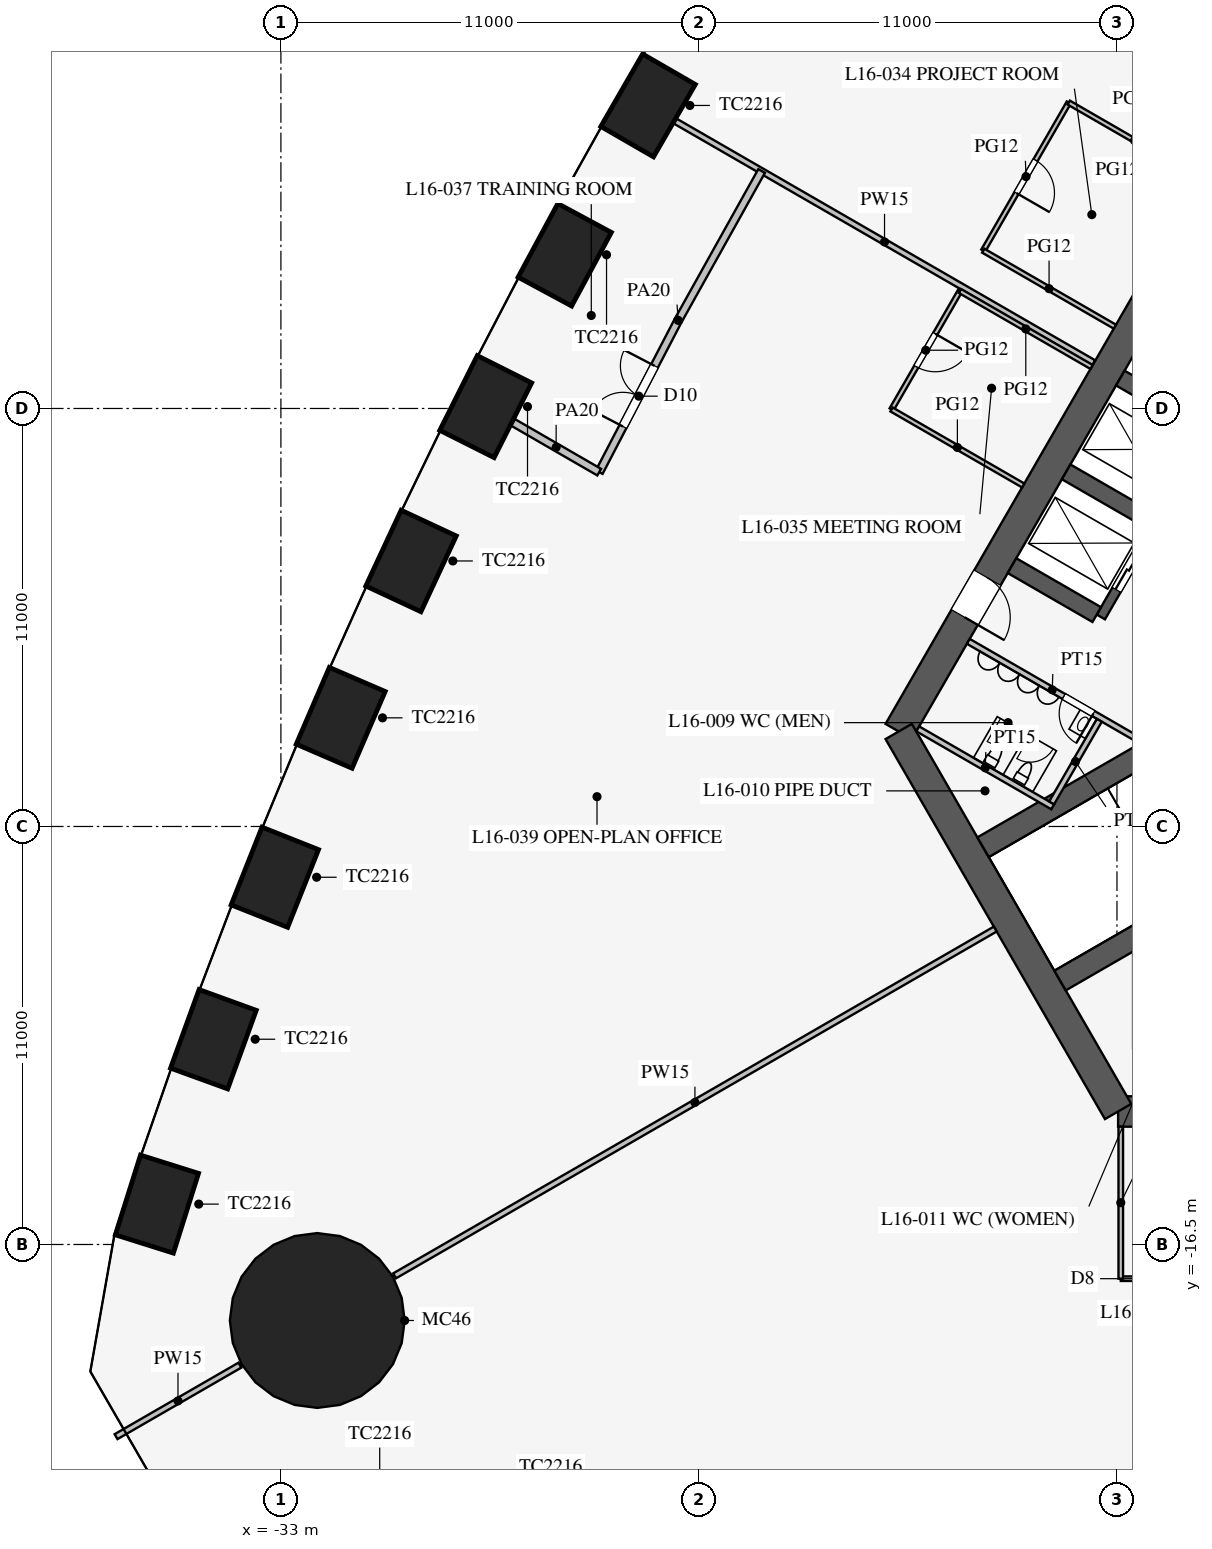
"""IFC4 building model, lengths in metres.
Left out: names, types, materials, properties, quantities, classifications, styles, units other than length and angle.
Written with IfcOpenShell. Run it as: python <this file> out.ifc"""

import sys

from ifc_helpers import new_model, si_unit, direction, frame, frame_2d, origin, origin_2d, place, context, subcontext, project, spatial, rectangle, circle, extrude, element, fill, save


model = new_model("IFC4")
c1 = context("Model", 3, precision=1e-05, world=origin(), true_north=direction((0.0, 1.0)))
c2 = subcontext(c1, "Body", "Model", "MODEL_VIEW")
j1 = project(units=[si_unit("LENGTHUNIT", "METRE"), si_unit("PLANEANGLEUNIT", "RADIAN")], contexts=[c1])
p1 = place(None, origin())
s1 = spatial("IfcSite", under=j1, at=p1, CompositionType="ELEMENT")
p2 = place(p1, origin())
s2 = spatial("IfcBuilding", under=s1, at=p2, CompositionType="ELEMENT")
p3 = place(p2, frame((0.0, 0.0, 71.1)))
s3 = spatial("IfcBuildingStorey", under=s2, at=p3, CompositionType="ELEMENT", Elevation=71.1)
for number, where, z_axis, x_axis in (
    (1, (-23.338, 13.474, 0.0), (0.0, 0.0, 1.0), (-0.5, -0.866, 0.0)),
    (2, (-25.531, 9.544, 0.0), (0.0, 0.0, 1.0), (-0.475, -0.88, 0.0)),
    (3, (-27.611, 5.549, 0.0), (0.0, 0.0, 1.0), (-0.449, -0.894, 0.0)),
    (4, (-29.576, 1.487, 0.0), (0.0, 0.0, 1.0), (-0.423, -0.906, 0.0)),
    (5, (-31.426, -2.641, 0.0), (0.0, 0.0, 1.0), (-0.396, -0.918, 0.0)),
    (6, (-33.16, -6.836, 0.0), (0.0, 0.0, 1.0), (-0.369, -0.929, 0.0)),
    (7, (-34.776, -11.099, 0.0), (0.0, 0.0, 1.0), (-0.342, -0.94, 0.0)),
    (8, (-36.262, -15.438, 0.0), (0.0, 0.0, 1.0), (-0.3, -0.954, 0.0)),
):
    element("IfcColumn", number, at=place(p3, frame(where, z_axis=z_axis, x_axis=x_axis)), inside=s3, PredefinedType="COLUMN", context=c2, shape_type="SweptSolid", body=[
        extrude(rectangle(XDim=2.2, YDim=1.6, at=origin_2d()), origin(), (0.0, 0.0, 1.0), 4.2),
    ])
p4 = place(p3, frame((-32.043, -18.5, 0.0), z_axis=(0.0, 0.0, 1.0), x_axis=(1.0, 0.0, 0.0)))
e9 = element("IfcColumn", 9, at=p4, inside=s3, PredefinedType="COLUMN", context=c2, shape_type="SweptSolid", body=[
    extrude(circle(Radius=2.3, at=origin_2d()), origin(), (0.0, 0.0, 1.0), 4.2),
])
p5 = place(p3, frame((-10.97, -13.0, 0.0), z_axis=(0.0, 0.0, 1.0), x_axis=(1.0, 0.0, 0.0)))
e10 = element("IfcWall", 10, at=p5, inside=s3, PredefinedType="SHEAR", context=c2, shape_type="SweptSolid", body=[
    extrude(rectangle(XDim=21.939, YDim=0.8, at=frame_2d((10.97, 0.0))), origin(), (0.0, 0.0, 1.0), 4.2),
])
p6 = place(p5, frame((17.27, 0.0, 0.0)))
e11 = element("IfcOpeningElement", 11, at=p6, cuts=e10, PredefinedType="OPENING", context=c2, shape_type="SweptSolid", body=[
    extrude(rectangle(XDim=1.2, YDim=2.1, at=frame_2d((0.6, 1.05))), frame((0.0, 0.41, 0.0), z_axis=(0.0, -1.0, 0.0), x_axis=(1.0, 0.0, 0.0)), (0.0, 0.0, 1.0), 0.82),
])
p7 = place(p5, frame((3.47, 0.0, 0.0)))
e12 = element("IfcOpeningElement", 12, at=p7, cuts=e10, PredefinedType="OPENING", context=c2, shape_type="SweptSolid", body=[
    extrude(rectangle(XDim=1.2, YDim=2.1, at=frame_2d((0.6, 1.05))), frame((0.0, 0.41, 0.0), z_axis=(0.0, -1.0, 0.0), x_axis=(1.0, 0.0, 0.0)), (0.0, 0.0, 1.0), 0.82),
])
p8 = place(p3, frame((-5.773, 16.0, 0.0), z_axis=(0.0, 0.0, 1.0), x_axis=(-0.500002442456, -0.866023993627, 0.0)))
e13 = element("IfcWall", 13, at=p8, inside=s3, PredefinedType="SHEAR", context=c2, shape_type="SweptSolid", body=[
    extrude(rectangle(XDim=21.939, YDim=0.8, at=frame_2d((10.97, 0.0))), origin(), (0.0, 0.0, 1.0), 4.2),
])
p9 = place(p8, frame((17.27, 0.0, 0.0)))
e14 = element("IfcOpeningElement", 14, at=p9, cuts=e13, PredefinedType="OPENING", context=c2, shape_type="SweptSolid", body=[
    extrude(rectangle(XDim=1.2, YDim=2.1, at=frame_2d((0.6, 1.05))), frame((0.0, 0.41, 0.0), z_axis=(0.0, -1.0, 0.0), x_axis=(1.0, 0.0, 0.0)), (0.0, 0.0, 1.0), 0.82),
])
p10 = place(p8, frame((3.47, 0.0, 0.0)))
e15 = element("IfcOpeningElement", 15, at=p10, cuts=e13, PredefinedType="OPENING", context=c2, shape_type="SweptSolid", body=[
    extrude(rectangle(XDim=1.2, YDim=2.1, at=frame_2d((0.6, 1.05))), frame((0.0, 0.41, 0.0), z_axis=(0.0, -1.0, 0.0), x_axis=(1.0, 0.0, 0.0)), (0.0, 0.0, 1.0), 0.82),
])
p11 = place(p3, frame((-16.743, -3.0, 0.0), z_axis=(0.0, 0.0, 1.0), x_axis=(0.499995765644, -0.866027848477, 0.0)))
e16 = element("IfcWall", 16, at=p11, inside=s3, PredefinedType="SHEAR", context=c2, shape_type="SweptSolid", body=[
    extrude(rectangle(XDim=11.547, YDim=0.8, at=frame_2d((5.773, 0.0))), origin(), (0.0, 0.0, 1.0), 4.2),
])
p12 = place(p3, frame((-5.724, 9.886, 0.0), z_axis=(0.0, 0.0, 1.0), x_axis=(-0.500001763848, -0.866024385424, 0.0)))
e17 = element("IfcWall", 17, at=p12, inside=s3, PredefinedType="SHEAR", context=c2, shape_type="SweptSolid", body=[
    extrude(rectangle(XDim=11.4, YDim=0.25, at=frame_2d((5.7, 0.0))), origin(), (0.0, 0.0, 1.0), 4.2),
])
p13 = place(p12, frame((6.525, 0.0, 0.0)))
e18 = element("IfcOpeningElement", 18, at=p13, cuts=e17, PredefinedType="OPENING", context=c2, shape_type="SweptSolid", body=[
    extrude(rectangle(XDim=1.2, YDim=2.2, at=frame_2d((0.6, 1.1))), frame((0.0, 0.135, 0.0), z_axis=(0.0, -1.0, 0.0), x_axis=(1.0, 0.0, 0.0)), (0.0, 0.0, 1.0), 0.27),
])
p14 = place(p12, frame((9.375, 0.0, 0.0)))
e19 = element("IfcOpeningElement", 19, at=p14, cuts=e17, PredefinedType="OPENING", context=c2, shape_type="SweptSolid", body=[
    extrude(rectangle(XDim=1.2, YDim=2.2, at=frame_2d((0.6, 1.1))), frame((0.0, 0.135, 0.0), z_axis=(0.0, -1.0, 0.0), x_axis=(1.0, 0.0, 0.0)), (0.0, 0.0, 1.0), 0.27),
])
for number, where, z_axis, x_axis in (
    (20, (-8.682, 5.012, 0.0), (0.0, 0.0, 1.0), (-0.866, 0.5, 0.0)),
    (21, (-10.107, 2.544, 0.0), (0.0, 0.0, 1.0), (-0.866, 0.5, 0.0)),
    (22, (-11.532, 0.076, 0.0), (0.0, 0.0, 1.0), (-0.866, 0.5, 0.0)),
):
    element("IfcWall", number, at=place(p3, frame(where, z_axis=z_axis, x_axis=x_axis)), inside=s3, PredefinedType="SHEAR", context=c2, shape_type="SweptSolid", body=[
        extrude(rectangle(XDim=2.575, YDim=0.45, at=frame_2d((1.288, 0.0))), origin(), (0.0, 0.0, 1.0), 4.2),
    ])
for number, where, z_axis, x_axis in (
    (23, (-6.663, -1.509, 0.0), (0.0, 0.0, 1.0), (-0.866, -0.5, 0.0)),
    (24, (-4.638, -5.016, 0.0), (0.0, 0.0, 1.0), (-0.866, -0.5, 0.0)),
):
    element("IfcWall", number, at=place(p3, frame(where, z_axis=z_axis, x_axis=x_axis)), inside=s3, PredefinedType="SHEAR", context=c2, shape_type="SweptSolid", body=[
        extrude(rectangle(XDim=9.075, YDim=0.6, at=frame_2d((4.538, 0.0))), origin(), (0.0, 0.0, 1.0), 4.2),
    ])
p15 = place(p3, frame((-10.495, -3.178, 0.0), z_axis=(0.0, 0.0, 1.0), x_axis=(-0.86602216432, 0.500005610874, 0.0)))
e25 = element("IfcWall", 25, at=p15, inside=s3, PredefinedType="PARTITIONING", context=c2, shape_type="SweptSolid", body=[
    extrude(rectangle(XDim=5.1, YDim=0.15, at=frame_2d((2.55, 0.0))), origin(), (0.0, 0.0, 1.0), 4.0),
])
p16 = place(p15, frame((1.3, 0.0, 0.0)))
e26 = element("IfcOpeningElement", 26, at=p16, cuts=e25, PredefinedType="OPENING", context=c2, shape_type="SweptSolid", body=[
    extrude(rectangle(XDim=0.9, YDim=2.1, at=frame_2d((0.45, 1.05))), frame((0.0, 0.085, 0.0), z_axis=(0.0, -1.0, 0.0), x_axis=(1.0, 0.0, 0.0)), (0.0, 0.0, 1.0), 0.17),
])
p17 = place(p3, frame((-12.691, -4.982, 0.0), z_axis=(0.0, 0.0, 1.0), x_axis=(-0.8660249478, 0.500000789788, 0.0)))
e27 = element("IfcWall", 27, at=p17, inside=s3, PredefinedType="PARTITIONING", context=c2, shape_type="SweptSolid", body=[
    extrude(rectangle(XDim=4.1, YDim=0.15, at=frame_2d((2.05, 0.0))), origin(), (0.0, 0.0, 1.0), 4.0),
])
p18 = place(p3, frame((-11.464, -2.706, 0.0), z_axis=(0.0, 0.0, 1.0), x_axis=(-0.50001992892, -0.866013897511, 0.0)))
e28 = element("IfcWall", 28, at=p18, inside=s3, PredefinedType="PARTITIONING", context=c2, shape_type="SweptSolid", body=[
    extrude(rectangle(XDim=2.51, YDim=0.15, at=frame_2d((1.255, 0.0))), origin(), (0.0, 0.0, 1.0), 4.0),
])
p19 = place(p3, frame((-14.203, -8.2, 0.0), z_axis=(0.0, 0.0, 1.0), x_axis=(-0.866024965723, -0.500000758745, 0.0)))
e29 = element("IfcWall", 29, at=p19, inside=s3, PredefinedType="PARTITIONING", context=c2, shape_type="SweptSolid", body=[
    extrude(rectangle(XDim=18.25, YDim=0.15, at=frame_2d((9.125, 0.0))), origin(), (0.0, 0.0, 1.0), 2.3),
])
p20 = place(p3, frame((-34.078, -19.675, 0.0), z_axis=(0.0, 0.0, 1.0), x_axis=(-0.866019247219, -0.500010663332, 0.0)))
e30 = element("IfcWall", 30, at=p20, inside=s3, PredefinedType="PARTITIONING", context=c2, shape_type="SweptSolid", body=[
    extrude(rectangle(XDim=3.764, YDim=0.15, at=frame_2d((1.882, 0.0))), origin(), (0.0, 0.0, 1.0), 2.3),
])
p21 = place(p3, frame((-10.9, -17.4, 0.0), z_axis=(0.0, 0.0, 1.0), x_axis=(1.0, 0.0, 0.0)))
e31 = element("IfcWall", 31, at=p21, inside=s3, PredefinedType="PARTITIONING", context=c2, shape_type="SweptSolid", body=[
    extrude(rectangle(XDim=2.4, YDim=0.12, at=frame_2d((1.2, 0.0))), origin(), (0.0, 0.0, 1.0), 2.9),
])
p22 = place(p21, frame((0.75, 0.0, 0.15)))
e32 = element("IfcOpeningElement", 32, at=p22, cuts=e31, PredefinedType="OPENING", context=c2, shape_type="SweptSolid", body=[
    extrude(rectangle(XDim=0.9, YDim=2.1, at=frame_2d((0.45, 1.05))), frame((0.0, 0.07, 0.0), z_axis=(0.0, -1.0, 0.0), x_axis=(1.0, 0.0, 0.0)), (0.0, 0.0, 1.0), 0.14),
])
p23 = place(p3, frame((-10.9, -13.4, 0.0), z_axis=(0.0, 0.0, 1.0), x_axis=(0.0, -1.0, 0.0)))
e33 = element("IfcWall", 33, at=p23, inside=s3, PredefinedType="PARTITIONING", context=c2, shape_type="SweptSolid", body=[
    extrude(rectangle(XDim=4.0, YDim=0.12, at=frame_2d((2.0, 0.0))), origin(), (0.0, 0.0, 1.0), 2.9),
])
p24 = place(p3, frame((-11.613, 6.705, 0.0), z_axis=(0.0, 0.0, 1.0), x_axis=(-0.866029791586, 0.499992400027, 0.0)))
e34 = element("IfcWall", 34, at=p24, inside=s3, PredefinedType="PARTITIONING", context=c2, shape_type="SweptSolid", body=[
    extrude(rectangle(XDim=12.709, YDim=0.15, at=frame_2d((6.354, 0.0))), origin(), (0.0, 0.0, 1.0), 2.8),
])
p25 = place(p3, frame((-15.131, 8.592, 0.0), z_axis=(0.0, 0.0, 1.0), x_axis=(-0.500012057535, -0.866018442252, 0.0)))
e35 = element("IfcWall", 35, at=p25, inside=s3, PredefinedType="PARTITIONING", context=c2, shape_type="SweptSolid", body=[
    extrude(rectangle(XDim=3.6, YDim=0.12, at=frame_2d((1.8, 0.0))), origin(), (0.0, 0.0, 1.0), 2.9),
])
p26 = place(p25, frame((1.3, 0.0, 0.15)))
e36 = element("IfcOpeningElement", 36, at=p26, cuts=e35, PredefinedType="OPENING", context=c2, shape_type="SweptSolid", body=[
    extrude(rectangle(XDim=1.0, YDim=2.1, at=frame_2d((0.5, 1.05))), frame((0.0, 0.07, 0.0), z_axis=(0.0, -1.0, 0.0), x_axis=(1.0, 0.0, 0.0)), (0.0, 0.0, 1.0), 0.14),
])
p27 = place(p3, frame((-12.269, 13.55, 0.0), z_axis=(0.0, 0.0, 1.0), x_axis=(-0.499990139034, -0.866031096941, 0.0)))
e37 = element("IfcWall", 37, at=p27, inside=s3, PredefinedType="PARTITIONING", context=c2, shape_type="SweptSolid", body=[
    extrude(rectangle(XDim=4.5, YDim=0.12, at=frame_2d((2.25, 0.0))), origin(), (0.0, 0.0, 1.0), 2.9),
])
p28 = place(p27, frame((1.75, 0.0, 0.15)))
e38 = element("IfcOpeningElement", 38, at=p28, cuts=e37, PredefinedType="OPENING", context=c2, shape_type="SweptSolid", body=[
    extrude(rectangle(XDim=1.0, YDim=2.1, at=frame_2d((0.5, 1.05))), frame((0.0, 0.07, 0.0), z_axis=(0.0, -1.0, 0.0), x_axis=(1.0, 0.0, 0.0)), (0.0, 0.0, 1.0), 0.14),
])
p29 = place(p3, frame((-11.667, 6.592, 0.0), z_axis=(0.0, 0.0, 1.0), x_axis=(-0.866026010844, 0.49999894854, 0.0)))
e39 = element("IfcWall", 39, at=p29, inside=s3, PredefinedType="PARTITIONING", context=c2, shape_type="SweptSolid", body=[
    extrude(rectangle(XDim=4.0, YDim=0.12, at=frame_2d((2.0, 0.0))), origin(), (0.0, 0.0, 1.0), 2.8),
])
for number, where, z_axis, x_axis in (
    (40, (-13.467, 3.474, 0.0), (0.0, 0.0, 1.0), (-0.866, 0.5, 0.0)),
    (41, (-11.055, 7.653, 0.0), (0.0, 0.0, 1.0), (-0.866, 0.5, 0.0)),
    (42, (-8.805, 11.55, 0.0), (0.0, 0.0, 1.0), (-0.866, 0.5, 0.0)),
    (43, (-7.355, 14.061, 0.0), (0.0, 0.0, 1.0), (-0.866, 0.5, 0.0)),
):
    element("IfcWall", number, at=place(p3, frame(where, z_axis=z_axis, x_axis=x_axis)), inside=s3, PredefinedType="PARTITIONING", context=c2, shape_type="SweptSolid", body=[
        extrude(rectangle(XDim=4.0, YDim=0.12, at=frame_2d((2.0, 0.0))), origin(), (0.0, 0.0, 1.0), 2.9),
    ])
p30 = place(p3, frame((-20.351, 11.749, 0.0), z_axis=(0.0, 0.0, 1.0), x_axis=(-0.487373854787, -0.873193406795, 0.0)))
e44 = element("IfcWall", 44, at=p30, inside=s3, PredefinedType="PARTITIONING", context=c2, shape_type="SweptSolid", body=[
    extrude(rectangle(XDim=4.5, YDim=0.2, at=frame_2d((2.25, 0.0))), origin(), (0.0, 0.0, 1.0), 2.9),
])
p31 = place(p3, frame((-22.544, 7.82, 0.0), z_axis=(0.0, 0.0, 1.0), x_axis=(-0.461810056307, -0.886978845235, 0.0)))
e45 = element("IfcWall", 45, at=p31, inside=s3, PredefinedType="PARTITIONING", context=c2, shape_type="SweptSolid", body=[
    extrude(rectangle(XDim=4.504, YDim=0.2, at=frame_2d((2.252, 0.0))), origin(), (0.0, 0.0, 1.0), 2.9),
])
p32 = place(p31, frame((1.35, 0.0, 0.15)))
e46 = element("IfcOpeningElement", 46, at=p32, cuts=e45, PredefinedType="OPENING", context=c2, shape_type="SweptSolid", body=[
    extrude(rectangle(XDim=1.8, YDim=2.1, at=frame_2d((0.9, 1.05))), frame((0.0, 0.11, 0.0), z_axis=(0.0, -1.0, 0.0), x_axis=(1.0, 0.0, 0.0)), (0.0, 0.0, 1.0), 0.22),
])
p33 = place(p3, frame((-24.624, 3.824, 0.0), z_axis=(0.0, 0.0, 1.0), x_axis=(-0.866053563643, 0.499951222523, 0.0)))
e47 = element("IfcWall", 47, at=p33, inside=s3, PredefinedType="PARTITIONING", context=c2, shape_type="SweptSolid", body=[
    extrude(rectangle(XDim=2.617, YDim=0.2, at=frame_2d((1.309, 0.0))), origin(), (0.0, 0.0, 1.0), 2.8),
])
p34 = place(p16, origin())
e48 = element("IfcDoor", 48, at=p34, inside=s3, OperationType="SINGLE_SWING_LEFT", PredefinedType="DOOR", context=c2, shape_type="SweptSolid", body=[
    extrude(rectangle(XDim=0.9, YDim=2.1, at=frame_2d((0.45, 1.05))), frame((0.0, 0.025, 0.0), z_axis=(0.0, -1.0, 0.0), x_axis=(1.0, 0.0, 0.0)), (0.0, 0.0, 1.0), 0.05),
])
fill(e26, e48)
p35 = place(p9, origin())
e49 = element("IfcDoor", 49, at=p35, inside=s3, OperationType="SINGLE_SWING_RIGHT", PredefinedType="DOOR", context=c2, shape_type="SweptSolid", body=[
    extrude(rectangle(XDim=1.2, YDim=2.1, at=frame_2d((0.6, 1.05))), frame((0.0, 0.025, 0.0), z_axis=(0.0, -1.0, 0.0), x_axis=(1.0, 0.0, 0.0)), (0.0, 0.0, 1.0), 0.05),
])
fill(e14, e49)
p36 = place(p28, origin())
e50 = element("IfcDoor", 50, at=p36, inside=s3, OperationType="SINGLE_SWING_RIGHT", PredefinedType="DOOR", context=c2, shape_type="SweptSolid", body=[
    extrude(rectangle(XDim=1.0, YDim=2.1, at=frame_2d((0.5, 1.05))), frame((0.0, 0.025, 0.0), z_axis=(0.0, -1.0, 0.0), x_axis=(1.0, 0.0, 0.0)), (0.0, 0.0, 1.0), 0.05),
])
fill(e38, e50)
p37 = place(p26, origin())
e51 = element("IfcDoor", 51, at=p37, inside=s3, OperationType="SINGLE_SWING_LEFT", PredefinedType="DOOR", context=c2, shape_type="SweptSolid", body=[
    extrude(rectangle(XDim=1.0, YDim=2.1, at=frame_2d((0.5, 1.05))), frame((0.0, 0.025, 0.0), z_axis=(0.0, -1.0, 0.0), x_axis=(1.0, 0.0, 0.0)), (0.0, 0.0, 1.0), 0.05),
])
fill(e36, e51)
p38 = place(p32, frame((1.8, 0.0, 0.0), z_axis=(0.0, 0.0, 1.0), x_axis=(-1.0, 0.0, 0.0)))
e52 = element("IfcDoor", 52, at=p38, inside=s3, OperationType="DOUBLE_DOOR_SINGLE_SWING", PredefinedType="DOOR", context=c2, shape_type="SweptSolid", body=[
    extrude(rectangle(XDim=1.8, YDim=2.1, at=frame_2d((0.9, 1.05))), frame((0.0, 0.025, 0.0), z_axis=(0.0, -1.0, 0.0), x_axis=(1.0, 0.0, 0.0)), (0.0, 0.0, 1.0), 0.05),
])
fill(e46, e52)
p39 = place(p14, origin())
e53 = element("IfcDoor", 53, at=p39, inside=s3, OperationType="DOUBLE_DOOR_SLIDING", PredefinedType="DOOR", context=c2, shape_type="SweptSolid", body=[
    extrude(rectangle(XDim=1.2, YDim=2.2, at=frame_2d((0.6, 1.1))), frame((0.0, 0.025, 0.0), z_axis=(0.0, -1.0, 0.0), x_axis=(1.0, 0.0, 0.0)), (0.0, 0.0, 1.0), 0.05),
])
fill(e19, e53)
save(model, sys.argv[1])
